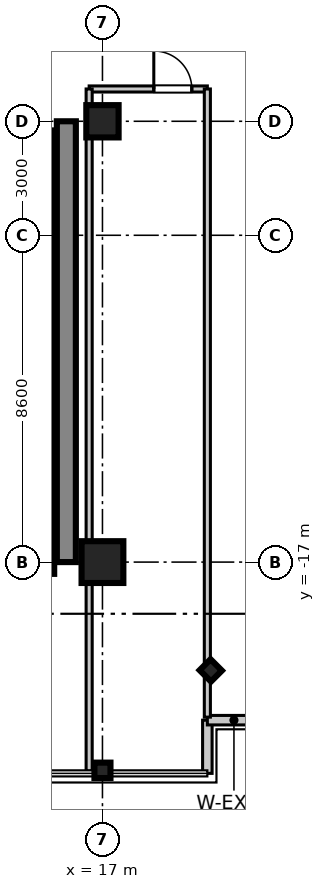
"""IFC4 building model, lengths in metres.
Left out: names, types, materials, properties, quantities, classifications, styles, units other than length and angle.
Written with IfcOpenShell. Run it as: python <this file> out.ifc"""

import sys

from ifc_helpers import new_model, si_unit, direction, frame, frame_2d, origin, origin_2d, place, context, subcontext, project, spatial, rectangle, i_section, extrude, source, transform, mapped, element, fill, save


model = new_model("IFC4")
c1 = context("Model", 3, precision=1e-05, world=origin(), true_north=direction((0.0, 1.0)))
c2 = subcontext(c1, "Body", "Model", "MODEL_VIEW")
j1 = project(units=[si_unit("LENGTHUNIT", "METRE"), si_unit("PLANEANGLEUNIT", "RADIAN")], contexts=[c1])
p1 = place(None, origin())
s1 = spatial("IfcSite", under=j1, at=p1, CompositionType="ELEMENT")
p2 = place(p1, origin())
s2 = spatial("IfcBuilding", under=s1, at=p2, CompositionType="ELEMENT")
p3 = place(p2, frame((0.0, 0.0, 170.9)))
s3 = spatial("IfcBuildingStorey", under=s2, at=p3, CompositionType="ELEMENT", Elevation=170.9)
m1 = source(origin(), c2, "Body", "SweptSolid", [
    extrude(rectangle(XDim=1.1, YDim=1.1, at=origin_2d()), origin(), (0.0, 0.0, 1.0), 3.605),
])
p4 = place(p3, frame((17.0, -17.0, 0.0), z_axis=(0.0, 0.0, 1.0), x_axis=(1.0, 0.0, 0.0)))
e1 = element("IfcColumn", 1, at=p4, inside=s3, PredefinedType="COLUMN", context=c2, shape_type="MappedRepresentation", body=[
    mapped(m1, transform((0.0, 0.0, 0.0), scale=1.0)),
])
m2 = source(origin(), c2, "Body", "SweptSolid", [
    extrude(rectangle(XDim=0.85, YDim=0.85, at=origin_2d()), origin(), (0.0, 0.0, 1.0), 3.605),
])
p5 = place(p3, frame((17.0, -5.4, 0.0), z_axis=(0.0, 0.0, 1.0), x_axis=(1.0, 0.0, 0.0)))
e2 = element("IfcColumn", 2, at=p5, inside=s3, PredefinedType="PILASTER", context=c2, shape_type="MappedRepresentation", body=[
    mapped(m2, transform((0.0, 0.0, 0.0), scale=1.0)),
])
m3 = source(origin(), c2, "Body", "SweptSolid", [
    extrude(i_section(OverallWidth=0.406, OverallDepth=0.422, WebThickness=0.019, FlangeThickness=0.03, at=origin_2d()), origin(), (0.0, 0.0, 1.0), 3.605),
])
for number, where, z_axis, x_axis in (
    (3, (17.0, -22.48, 0.0), (0.0, 0.0, 1.0), (0.0, 1.0, 0.0)),
    (4, (19.85, -19.85, 0.0), (0.0, 0.0, 1.0), (0.707, 0.707, 0.0)),
):
    element("IfcColumn", number, at=place(p3, frame(where, z_axis=z_axis, x_axis=x_axis)), inside=s3, PredefinedType="COLUMN", context=c2, shape_type="MappedRepresentation", body=[
        mapped(m3, transform((0.0, 0.0, 0.0), scale=1.0)),
    ])
m4 = source(origin(), c2, "Body", "SweptSolid", [
    extrude(rectangle(XDim=11.6, YDim=0.5, at=frame_2d((5.8, 0.0))), origin(), (0.0, 0.0, 1.0), 3.39),
])
p6 = place(p3, frame((16.05, -17.0, 0.0), z_axis=(0.0, 0.0, 1.0), x_axis=(0.0, 1.0, 0.0)))
e5 = element("IfcWall", 5, at=p6, inside=s3, PredefinedType="SHEAR", context=c2, shape_type="MappedRepresentation", body=[
    mapped(m4, transform((0.0, 0.0, 0.0), scale=1.0)),
])
m5 = source(origin(), c2, "Body", "SweptSolid", [
    extrude(rectangle(XDim=2.36, YDim=0.22, at=frame_2d((1.18, 0.0))), origin(), (0.0, 0.0, 1.0), 3.39),
])
p7 = place(p3, frame((15.62, -8.0, 0.0), z_axis=(0.0, 0.0, 1.0), x_axis=(0.0, 1.0, 0.0)))
e6 = element("IfcWall", 6, at=p7, inside=s3, PredefinedType="SHEAR", context=c2, shape_type="MappedRepresentation", body=[
    mapped(m5, transform((0.0, 0.0, 0.0), scale=1.0)),
])
m6 = source(origin(), c2, "Body", "SweptSolid", [
    extrude(rectangle(XDim=2.2, YDim=0.22, at=frame_2d((1.1, 0.0))), origin(), (0.0, 0.0, 1.0), 3.39),
])
for number, where, z_axis, x_axis in (
    (7, (15.62, -10.2, 0.0), (0.0, 0.0, 1.0), (0.0, 1.0, 0.0)),
    (8, (15.62, -12.4, 0.0), (0.0, 0.0, 1.0), (0.0, 1.0, 0.0)),
):
    element("IfcWall", number, at=place(p3, frame(where, z_axis=z_axis, x_axis=x_axis)), inside=s3, PredefinedType="SHEAR", context=c2, shape_type="MappedRepresentation", body=[
        mapped(m6, transform((0.0, 0.0, 0.0), scale=1.0)),
    ])
m7 = source(origin(), c2, "Body", "SweptSolid", [
    extrude(rectangle(XDim=2.3, YDim=0.22, at=frame_2d((1.15, 0.0))), origin(), (0.0, 0.0, 1.0), 3.39),
])
p8 = place(p3, frame((15.62, -14.7, 0.0), z_axis=(0.0, 0.0, 1.0), x_axis=(0.0, 1.0, 0.0)))
e9 = element("IfcWall", 9, at=p8, inside=s3, PredefinedType="SHEAR", context=c2, shape_type="MappedRepresentation", body=[
    mapped(m7, transform((0.0, 0.0, 0.0), scale=1.0)),
])
m8 = source(origin(), c2, "Body", "SweptSolid", [
    extrude(rectangle(XDim=2.61, YDim=0.22, at=frame_2d((1.305, 0.0))), origin(), (0.0, 0.0, 1.0), 3.39),
])
p9 = place(p3, frame((15.62, -17.31, 0.0), z_axis=(0.0, 0.0, 1.0), x_axis=(0.0, 1.0, 0.0)))
e10 = element("IfcWall", 10, at=p9, inside=s3, PredefinedType="SHEAR", context=c2, shape_type="MappedRepresentation", body=[
    mapped(m8, transform((0.0, 0.0, 0.0), scale=1.0)),
])
m9 = source(origin(), c2, "Body", "SweptSolid", [
    extrude(rectangle(XDim=1.4, YDim=0.25, at=frame_2d((0.7, 0.0))), origin(), (0.0, 0.0, 1.0), 3.39),
])
p10 = place(p3, frame((19.76, -22.56, 0.0), z_axis=(0.0, 0.0, 1.0), x_axis=(0.0, 1.0, 0.0)))
e11 = element("IfcWall", 11, at=p10, inside=s3, PredefinedType="STANDARD", context=c2, shape_type="MappedRepresentation", body=[
    mapped(m9, transform((0.0, 0.0, 0.0), scale=1.0)),
])
m10 = source(origin(), c2, "Body", "SweptSolid", [
    extrude(rectangle(XDim=1.4, YDim=0.25, at=frame_2d((0.7, 0.0))), origin(), (0.0, 0.0, 1.0), 3.39),
])
p11 = place(p3, frame((19.76, -21.16, 0.0), z_axis=(0.0, 0.0, 1.0), x_axis=(1.0, 0.0, 0.0)))
e12 = element("IfcWall", 12, at=p11, inside=s3, PredefinedType="STANDARD", context=c2, shape_type="MappedRepresentation", body=[
    mapped(m10, transform((0.0, 0.0, 0.0), scale=1.0)),
])
m11 = source(origin(), c2, "Body", "SweptSolid", [
    extrude(rectangle(XDim=3.11, YDim=0.16, at=frame_2d((1.555, 0.0))), origin(), (0.0, 0.0, 1.0), 2.73),
])
p12 = place(p3, frame((16.65, -4.55, 0.0), z_axis=(0.0, 0.0, 1.0), x_axis=(1.0, 0.0, 0.0)))
e13 = element("IfcWall", 13, at=p12, inside=s3, PredefinedType="PARTITIONING", context=c2, shape_type="MappedRepresentation", body=[
    mapped(m11, transform((0.0, 0.0, 0.0), scale=1.0)),
])
p13 = place(p12, frame((1.701, 0.0, 0.0)))
e14 = element("IfcOpeningElement", 14, at=p13, cuts=e13, PredefinedType="OPENING", context=c2, shape_type="SweptSolid", body=[
    extrude(rectangle(XDim=1.0, YDim=2.1, at=frame_2d((0.5, 1.05))), frame((0.0, 0.09, 0.0), z_axis=(0.0, -1.0, 0.0), x_axis=(1.0, 0.0, 0.0)), (0.0, 0.0, 1.0), 0.18),
])
m12 = source(origin(), c2, "Body", "SweptSolid", [
    extrude(rectangle(XDim=17.95, YDim=0.16, at=frame_2d((8.975, 0.0))), origin(), (0.0, 0.0, 1.0), 2.73),
])
p14 = place(p3, frame((16.65, -22.5, 0.0), z_axis=(0.0, 0.0, 1.0), x_axis=(0.0, 1.0, 0.0)))
e15 = element("IfcWall", 15, at=p14, inside=s3, PredefinedType="PARTITIONING", context=c2, shape_type="MappedRepresentation", body=[
    mapped(m12, transform((0.0, 0.0, 0.0), scale=1.0)),
])
m13 = source(origin(), c2, "Body", "SweptSolid", [
    extrude(rectangle(XDim=16.53, YDim=0.16, at=frame_2d((8.265, 0.0))), origin(), (0.0, 0.0, 1.0), 2.73),
])
p15 = place(p3, frame((19.76, -21.08, 0.0), z_axis=(0.0, 0.0, 1.0), x_axis=(0.0, 1.0, 0.0)))
e16 = element("IfcWall", 16, at=p15, inside=s3, PredefinedType="PARTITIONING", context=c2, shape_type="MappedRepresentation", body=[
    mapped(m13, transform((0.0, 0.0, 0.0), scale=1.0)),
])
m14 = source(origin(), c2, "Body", "SweptSolid", [
    extrude(rectangle(XDim=1.0, YDim=2.1, at=frame_2d((0.5, 1.05))), frame((0.0, 0.025, 0.0), z_axis=(0.0, -1.0, 0.0), x_axis=(1.0, 0.0, 0.0)), (0.0, 0.0, 1.0), 0.05),
])
p16 = place(p13, frame((1.0, 0.0, 0.0), z_axis=(0.0, 0.0, 1.0), x_axis=(-1.0, 0.0, 0.0)))
e17 = element("IfcDoor", 17, at=p16, inside=s3, OperationType="SINGLE_SWING_LEFT", PredefinedType="DOOR", context=c2, shape_type="MappedRepresentation", body=[
    mapped(m14, transform((0.0, 0.0, 0.0), scale=1.0)),
])
fill(e14, e17)
save(model, sys.argv[1])
